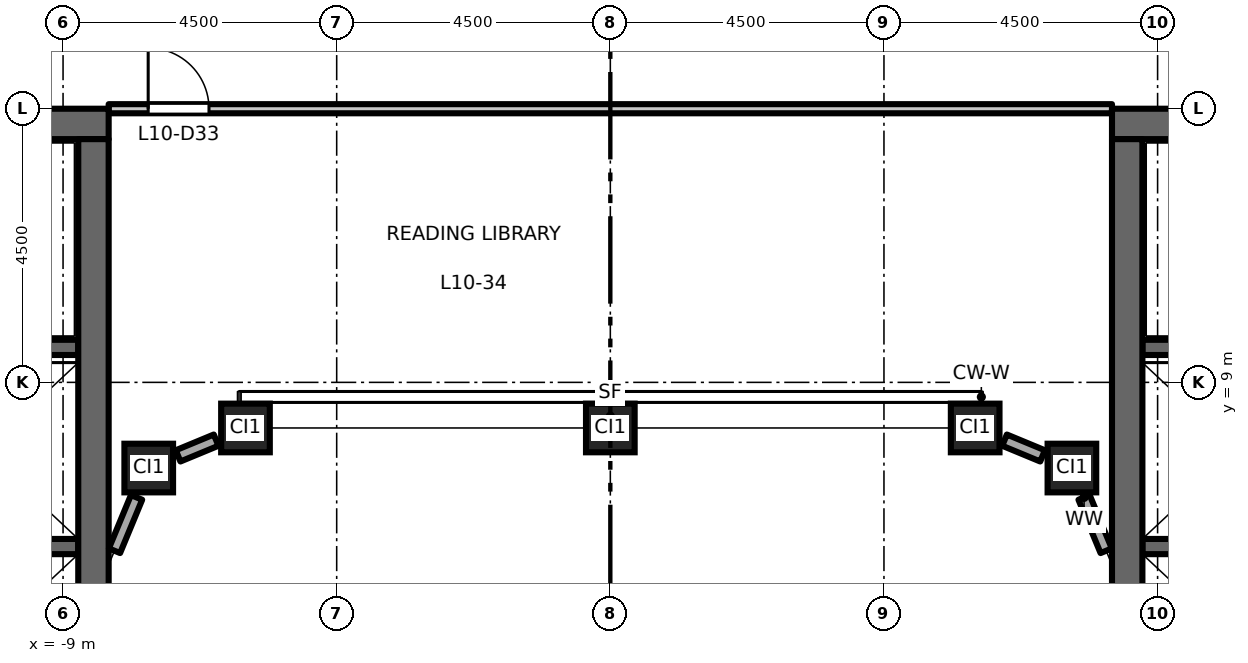
"""IFC4 building model, lengths in metres.
Left out: names, types, materials, properties, quantities, classifications, styles, units other than length and angle.
Written with IfcOpenShell. Run it as: python <this file> out.ifc"""

import sys

from ifc_helpers import new_model, si_unit, direction, frame, frame_2d, origin, origin_2d, place, context, subcontext, project, spatial, rectangle, hollow_rectangle, extrude, element, fill, save


model = new_model("IFC4")
c1 = context("Model", 3, precision=1e-05, world=origin(), true_north=direction((0.0, 1.0)))
c2 = subcontext(c1, "Body", "Model", "MODEL_VIEW")
j1 = project(units=[si_unit("LENGTHUNIT", "METRE"), si_unit("PLANEANGLEUNIT", "RADIAN")], contexts=[c1])
p1 = place(None, origin())
s1 = spatial("IfcSite", under=j1, at=p1, CompositionType="ELEMENT")
p2 = place(p1, origin())
s2 = spatial("IfcBuilding", under=s1, at=p2, CompositionType="ELEMENT")
p3 = place(p2, frame((0.0, 0.0, 49.2)))
s3 = spatial("IfcBuildingStorey", under=s2, at=p3, CompositionType="ELEMENT", Elevation=49.2)
for number, where, z_axis, x_axis in (
    (1, (-7.591, 7.591, 0.0), (0.0, 0.0, 1.0), (1.0, 0.0, 0.0)),
    (2, (-6.0, 8.25, 0.0), (0.0, 0.0, 1.0), (1.0, 0.0, 0.0)),
    (3, (0.0, 8.25, 0.0), (0.0, 0.0, 1.0), (1.0, 0.0, 0.0)),
    (4, (6.0, 8.25, 0.0), (0.0, 0.0, 1.0), (1.0, 0.0, 0.0)),
    (5, (7.591, 7.591, 0.0), (0.0, 0.0, 1.0), (1.0, 0.0, 0.0)),
):
    element("IfcColumn", number, at=place(p3, frame(where, z_axis=z_axis, x_axis=x_axis)), inside=s3, PredefinedType="COLUMN", context=c2, shape_type="SweptSolid", body=[
        extrude(hollow_rectangle(XDim=0.8, YDim=0.8, WallThickness=0.05, at=origin_2d()), origin(), (0.0, 0.0, 1.0), 4.5),
    ])
p4 = place(p3, frame((-8.75, 6.3, 0.0), z_axis=(0.0, 0.0, 1.0), x_axis=(-1.0, 0.0, 0.0)))
e6 = element("IfcWall", 6, at=p4, inside=s3, PredefinedType="SHEAR", context=c2, shape_type="SweptSolid", body=[
    extrude(rectangle(XDim=3.1, YDim=0.25, at=frame_2d((1.55, 0.0))), origin(), (0.0, 0.0, 1.0), 4.35),
])
p5 = place(p3, frame((-8.75, 9.575, 0.0), z_axis=(0.0, 0.0, 1.0), x_axis=(-1.0, 0.0, 0.0)))
e7 = element("IfcWall", 7, at=p5, inside=s3, PredefinedType="SHEAR", context=c2, shape_type="SweptSolid", body=[
    extrude(rectangle(XDim=8.0, YDim=0.25, at=frame_2d((4.0, 0.0))), origin(), (0.0, 0.0, 1.0), 4.35),
])
p6 = place(p5, frame((6.65, 0.0, 0.0)))
e8 = element("IfcOpeningElement", 8, at=p6, cuts=e7, PredefinedType="OPENING", context=c2, shape_type="SweptSolid", body=[
    extrude(rectangle(XDim=1.1, YDim=2.1, at=frame_2d((0.55, 1.05))), frame((0.0, 0.135, 0.0), z_axis=(0.0, -1.0, 0.0), x_axis=(1.0, 0.0, 0.0)), (0.0, 0.0, 1.0), 0.27),
])
p7 = place(p3, frame((-8.25, 13.25, 0.0), z_axis=(0.0, 0.0, 1.0), x_axis=(-1.0, 0.0, 0.0)))
e9 = element("IfcWall", 9, at=p7, inside=s3, PredefinedType="SHEAR", context=c2, shape_type="SweptSolid", body=[
    extrude(rectangle(XDim=13.5, YDim=0.5, at=frame_2d((6.75, 0.0))), origin(), (0.0, 0.0, 1.0), 4.35),
])
p8 = place(p3, frame((-8.5, -13.0, 0.0), z_axis=(0.0, 0.0, 1.0), x_axis=(0.0, 1.0, 0.0)))
e10 = element("IfcWall", 10, at=p8, inside=s3, PredefinedType="SHEAR", context=c2, shape_type="SweptSolid", body=[
    extrude(rectangle(XDim=26.0, YDim=0.5, at=frame_2d((13.0, 0.0))), origin(), (0.0, 0.0, 1.0), 4.35),
])
p9 = place(p3, frame((8.75, 6.3, 0.0), z_axis=(0.0, 0.0, 1.0), x_axis=(1.0, 0.0, 0.0)))
e11 = element("IfcWall", 11, at=p9, inside=s3, PredefinedType="SHEAR", context=c2, shape_type="SweptSolid", body=[
    extrude(rectangle(XDim=3.1, YDim=0.25, at=frame_2d((1.55, 0.0))), origin(), (0.0, 0.0, 1.0), 4.35),
])
p10 = place(p3, frame((8.75, 9.575, 0.0), z_axis=(0.0, 0.0, 1.0), x_axis=(1.0, 0.0, 0.0)))
e12 = element("IfcWall", 12, at=p10, inside=s3, PredefinedType="SHEAR", context=c2, shape_type="SweptSolid", body=[
    extrude(rectangle(XDim=8.0, YDim=0.25, at=frame_2d((4.0, 0.0))), origin(), (0.0, 0.0, 1.0), 4.35),
])
p11 = place(p10, frame((6.65, 0.0, 0.0)))
e13 = element("IfcOpeningElement", 13, at=p11, cuts=e12, PredefinedType="OPENING", context=c2, shape_type="SweptSolid", body=[
    extrude(rectangle(XDim=1.1, YDim=2.1, at=frame_2d((0.55, 1.05))), frame((0.0, 0.135, 0.0), z_axis=(0.0, -1.0, 0.0), x_axis=(1.0, 0.0, 0.0)), (0.0, 0.0, 1.0), 0.27),
])
p12 = place(p3, frame((8.25, 13.25, 0.0), z_axis=(0.0, 0.0, 1.0), x_axis=(1.0, 0.0, 0.0)))
e14 = element("IfcWall", 14, at=p12, inside=s3, PredefinedType="SHEAR", context=c2, shape_type="SweptSolid", body=[
    extrude(rectangle(XDim=13.5, YDim=0.5, at=frame_2d((6.75, 0.0))), origin(), (0.0, 0.0, 1.0), 4.35),
])
p13 = place(p3, frame((8.5, -13.0, 0.0), z_axis=(0.0, 0.0, 1.0), x_axis=(0.0, 1.0, 0.0)))
e15 = element("IfcWall", 15, at=p13, inside=s3, PredefinedType="SHEAR", context=c2, shape_type="SweptSolid", body=[
    extrude(rectangle(XDim=26.0, YDim=0.5, at=frame_2d((13.0, 0.0))), origin(), (0.0, 0.0, 1.0), 4.35),
])
p14 = place(p3, frame((8.154, 6.231, 0.0), z_axis=(0.0, 0.0, 1.0), x_axis=(-0.382624318388, 0.923904016107, 0.0)))
e16 = element("IfcWall", 16, at=p14, inside=s3, PredefinedType="STANDARD", context=c2, shape_type="SweptSolid", body=[
    extrude(rectangle(XDim=0.949, YDim=0.2, at=frame_2d((0.475, 0.0))), origin(), (0.0, 0.0, 1.0), 3.73),
])
for number, where, z_axis, x_axis in (
    (17, (7.108, 7.791, 0.0), (0.0, 0.0, 1.0), (-0.924, 0.383, 0.0)),
    (18, (-6.483, 8.05, 0.0), (0.0, 0.0, 1.0), (-0.924, -0.383, 0.0)),
):
    element("IfcWall", number, at=place(p3, frame(where, z_axis=z_axis, x_axis=x_axis)), inside=s3, PredefinedType="STANDARD", context=c2, shape_type="SweptSolid", body=[
        extrude(rectangle(XDim=0.677, YDim=0.2, at=frame_2d((0.338, 0.0))), origin(), (0.0, 0.0, 1.0), 3.73),
    ])
p15 = place(p3, frame((-7.791, 7.108, 0.0), z_axis=(0.0, 0.0, 1.0), x_axis=(-0.382624318388, -0.923904016107, 0.0)))
e19 = element("IfcWall", 19, at=p15, inside=s3, PredefinedType="STANDARD", context=c2, shape_type="SweptSolid", body=[
    extrude(rectangle(XDim=0.949, YDim=0.2, at=frame_2d((0.475, 0.0))), origin(), (0.0, 0.0, 1.0), 3.73),
])
p16 = place(p3, frame((-8.25, 13.5, 0.0), z_axis=(0.0, 0.0, 1.0), x_axis=(1.0, 0.0, 0.0)))
e20 = element("IfcWall", 20, at=p16, inside=s3, PredefinedType="PARTITIONING", context=c2, shape_type="SweptSolid", body=[
    extrude(rectangle(XDim=16.5, YDim=0.15, at=frame_2d((8.25, 0.0))), origin(), (0.0, 0.0, 1.0), 3.85),
])
p17 = place(p16, frame((0.65, 0.0, 0.0)))
e21 = element("IfcOpeningElement", 21, at=p17, cuts=e20, PredefinedType="OPENING", context=c2, shape_type="SweptSolid", body=[
    extrude(rectangle(XDim=1.0, YDim=2.1, at=frame_2d((0.5, 1.05))), frame((0.0, 0.085, 0.0), z_axis=(0.0, -1.0, 0.0), x_axis=(1.0, 0.0, 0.0)), (0.0, 0.0, 1.0), 0.17),
])
p18 = place(p17, origin())
e22 = element("IfcDoor", 22, at=p18, inside=s3, OperationType="SINGLE_SWING_LEFT", PredefinedType="DOOR", context=c2, shape_type="SweptSolid", body=[
    extrude(rectangle(XDim=1.0, YDim=2.1, at=frame_2d((0.5, 1.05))), frame((0.0, 0.025, 0.0), z_axis=(0.0, -1.0, 0.0), x_axis=(1.0, 0.0, 0.0)), (0.0, 0.0, 1.0), 0.05),
])
fill(e21, e22)
save(model, sys.argv[1])
